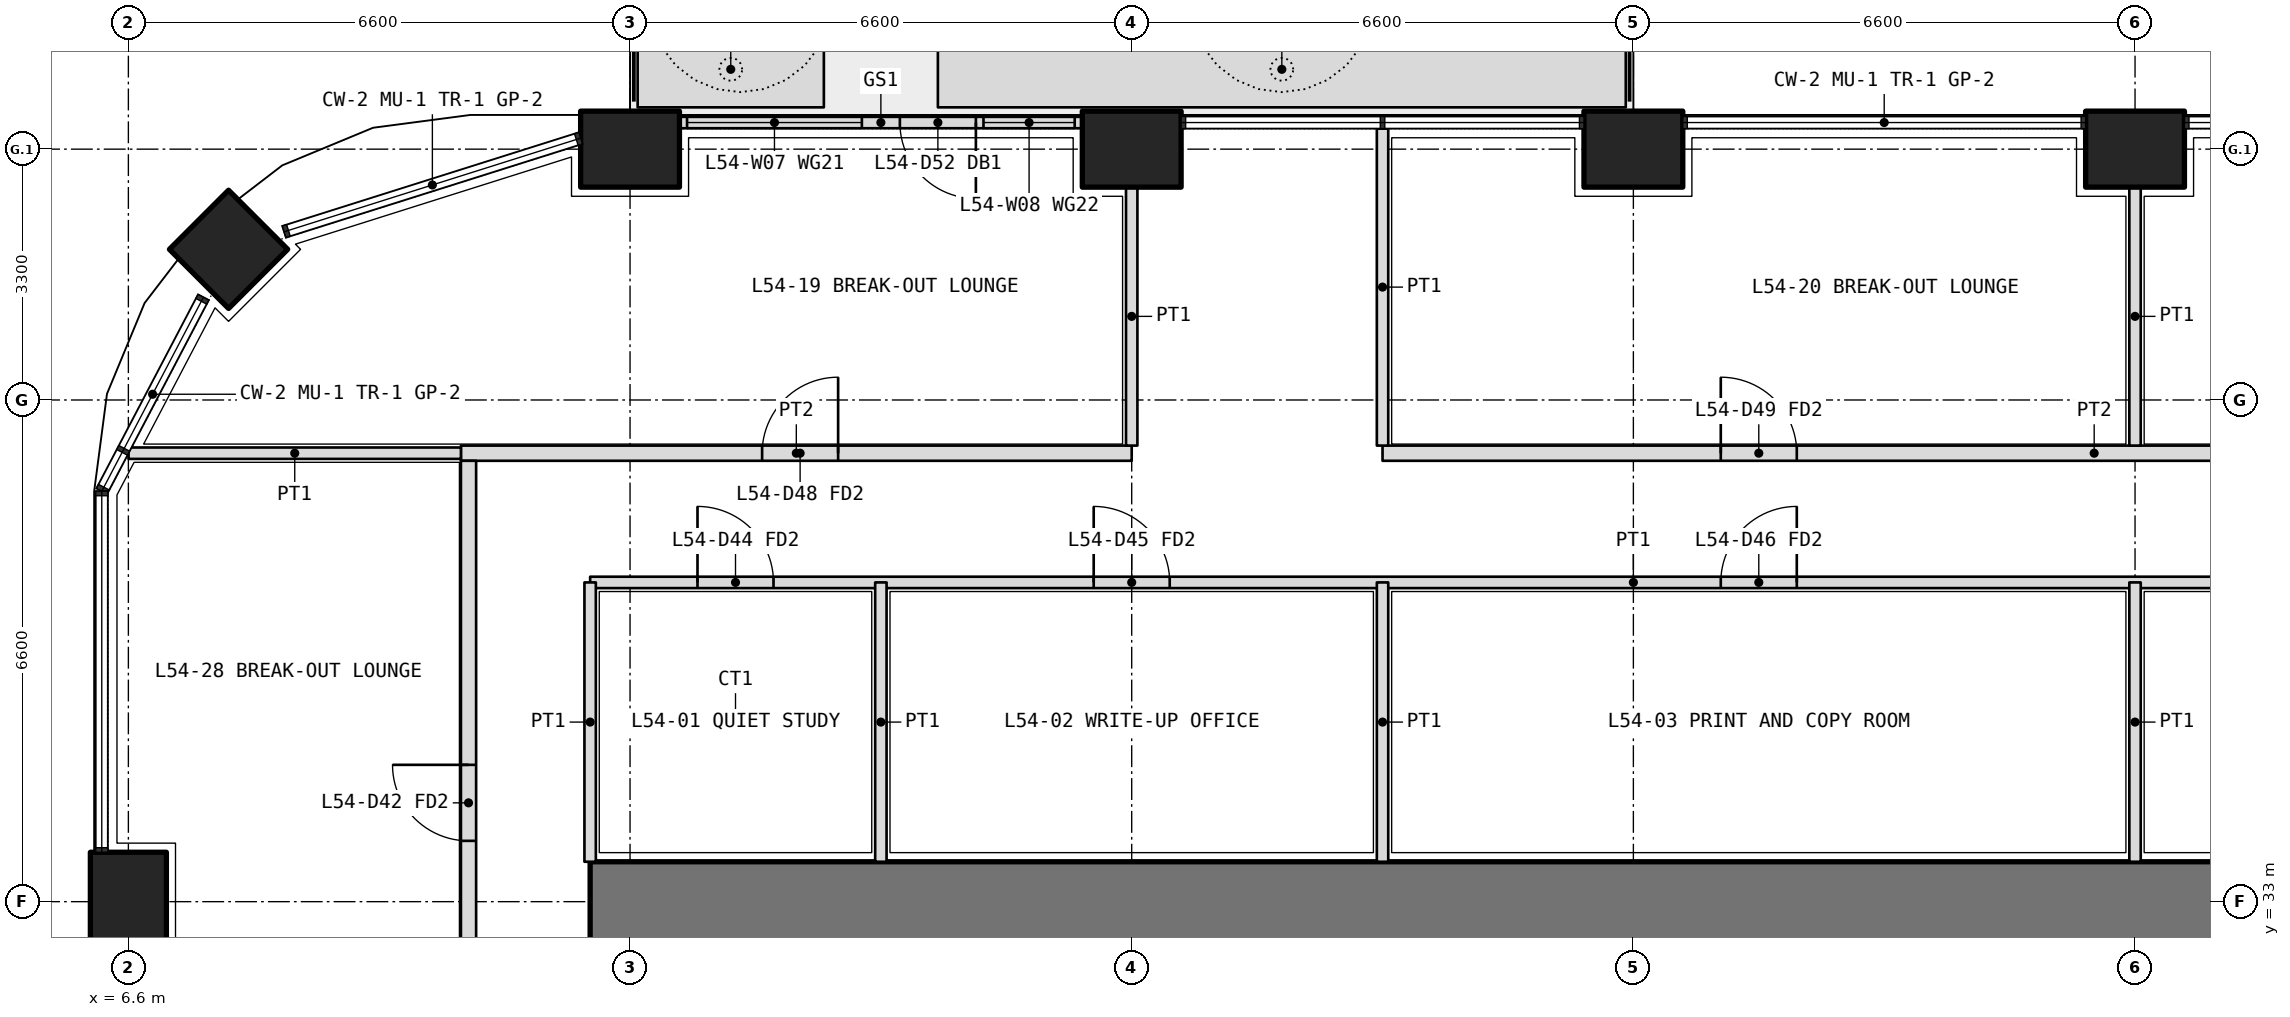
"""IFC4 building model, lengths in metres.
Left out: names, types, materials, properties, quantities, classifications, styles, units other than length and angle.
Written with IfcOpenShell. Run it as: python <this file> out.ifc"""

import sys

from ifc_helpers import new_model, si_unit, direction, frame, frame_2d, origin, origin_2d, place, context, subcontext, project, spatial, polyline, rectangle, outline, extrude, element, fill, save


model = new_model("IFC4")
c1 = context("Model", 3, precision=1e-05, world=origin(), true_north=direction((0.0, 1.0)))
c2 = subcontext(c1, "Body", "Model", "MODEL_VIEW")
j1 = project(units=[si_unit("LENGTHUNIT", "METRE"), si_unit("PLANEANGLEUNIT", "RADIAN")], contexts=[c1])
p1 = place(None, origin())
s1 = spatial("IfcSite", under=j1, at=p1, CompositionType="ELEMENT")
p2 = place(p1, origin())
s2 = spatial("IfcBuilding", under=s1, at=p2, CompositionType="ELEMENT")
p3 = place(p2, frame((0.0, 0.0, 237.6)))
s3 = spatial("IfcBuildingStorey", under=s2, at=p3, CompositionType="ELEMENT", Elevation=237.6)
p4 = place(p3, frame((7.918, 41.582, 0.0), z_axis=(0.0, 0.0, 1.0), x_axis=(0.707106781187, 0.707106781187, 0.0)))
e1 = element("IfcColumn", 1, at=p4, inside=s3, PredefinedType="COLUMN", context=c2, shape_type="SweptSolid", body=[
    extrude(rectangle(XDim=1.1, YDim=1.1, at=origin_2d()), origin(), (0.0, 0.0, 1.0), 4.2),
])
for number, where, z_axis, x_axis in (
    (2, (6.6, 33.0, 0.0), (0.0, 0.0, 1.0), (0.0, 1.0, 0.0)),
    (3, (13.2, 42.9, 0.0), (0.0, 0.0, 1.0), (1.0, 0.0, 0.0)),
    (4, (19.8, 42.9, 0.0), (0.0, 0.0, 1.0), (1.0, 0.0, 0.0)),
    (5, (26.4, 42.9, 0.0), (0.0, 0.0, 1.0), (1.0, 0.0, 0.0)),
    (6, (33.0, 42.9, 0.0), (0.0, 0.0, 1.0), (1.0, 0.0, 0.0)),
):
    element("IfcColumn", number, at=place(p3, frame(where, z_axis=z_axis, x_axis=x_axis)), inside=s3, PredefinedType="COLUMN", context=c2, shape_type="SweptSolid", body=[
        extrude(rectangle(XDim=1.3, YDim=1.0, at=origin_2d()), origin(), (0.0, 0.0, 1.0), 4.2),
    ])
p5 = place(p3, origin())
e7 = element("IfcWall", 7, at=p5, inside=s3, PredefinedType="USERDEFINED", context=c2, shape_type="SweptSolid", body=[
    extrude(outline(polyline([(13.3, 43.45), (15.75, 43.45), (15.75, 44.45), (13.3, 44.45), (13.3, 43.45)]), holes=[polyline([(13.45, 43.6), (15.6, 43.6), (15.6, 44.3), (13.45, 44.3), (13.45, 43.6)])]), origin(), (0.0, 0.0, 1.0), 1.05),
])
p6 = place(p3, origin())
e8 = element("IfcWall", 8, at=p6, inside=s3, PredefinedType="USERDEFINED", context=c2, shape_type="SweptSolid", body=[
    extrude(outline(polyline([(17.25, 43.45), (26.3, 43.45), (26.3, 44.45), (17.25, 44.45), (17.25, 43.45)]), holes=[polyline([(17.4, 43.6), (26.15, 43.6), (26.15, 44.3), (17.4, 44.3), (17.4, 43.6)])]), origin(), (0.0, 0.0, 1.0), 1.05),
])
p7 = place(p3, frame((19.15, 43.25, 0.0), z_axis=(0.0, 0.0, 1.0), x_axis=(-1.0, 0.0, 0.0)))
e9 = element("IfcWall", 9, at=p7, inside=s3, PredefinedType="SOLIDWALL", context=c2, shape_type="SweptSolid", body=[
    extrude(rectangle(XDim=5.3, YDim=0.15, at=frame_2d((2.65, 0.0))), origin(), (0.0, 0.0, 1.0), 2.7),
])
p8 = place(p7, frame((1.4, 0.0, 0.0)))
e10 = element("IfcOpeningElement", 10, at=p8, cuts=e9, PredefinedType="OPENING", context=c2, shape_type="SweptSolid", body=[
    extrude(rectangle(XDim=1.0, YDim=2.4, at=frame_2d((0.5, 1.2))), frame((0.0, 0.085, 0.0), z_axis=(0.0, -1.0, 0.0), x_axis=(1.0, 0.0, 0.0)), (0.0, 0.0, 1.0), 0.17),
])
p9 = place(p7, frame((0.1, 0.0, 0.1)))
e11 = element("IfcOpeningElement", 11, at=p9, cuts=e9, PredefinedType="OPENING", context=c2, shape_type="SweptSolid", body=[
    extrude(rectangle(XDim=1.2, YDim=2.3, at=frame_2d((0.6, 1.15))), frame((0.0, 0.085, 0.0), z_axis=(0.0, -1.0, 0.0), x_axis=(1.0, 0.0, 0.0)), (0.0, 0.0, 1.0), 0.17),
])
p10 = place(p7, frame((2.9, 0.0, 0.1)))
e12 = element("IfcOpeningElement", 12, at=p10, cuts=e9, PredefinedType="OPENING", context=c2, shape_type="SweptSolid", body=[
    extrude(rectangle(XDim=2.3, YDim=2.3, at=frame_2d((1.15, 1.15))), frame((0.0, 0.085, 0.0), z_axis=(0.0, -1.0, 0.0), x_axis=(1.0, 0.0, 0.0)), (0.0, 0.0, 1.0), 0.17),
])
p11 = place(p3, frame((40.125, 33.0, 0.0), z_axis=(0.0, 0.0, 1.0), x_axis=(-1.0, 0.0, 0.0)))
e13 = element("IfcWall", 13, at=p11, inside=s3, PredefinedType="SHEAR", context=c2, shape_type="SweptSolid", body=[
    extrude(rectangle(XDim=27.45, YDim=1.05, at=frame_2d((13.725, 0.0))), origin(), (0.0, 0.0, 1.0), 4.2),
])
p12 = place(p3, frame((12.675, 37.2, 0.0), z_axis=(0.0, 0.0, 1.0), x_axis=(1.0, 0.0, 0.0)))
e14 = element("IfcWall", 14, at=p12, inside=s3, PredefinedType="PARTITIONING", context=c2, shape_type="SweptSolid", body=[
    extrude(rectangle(XDim=27.45, YDim=0.15, at=frame_2d((13.725, 0.0))), origin(), (0.0, 0.0, 1.0), 3.0),
])
p13 = place(p12, frame((1.413, 0.0, 0.0)))
e15 = element("IfcOpeningElement", 15, at=p13, cuts=e14, PredefinedType="OPENING", context=c2, shape_type="SweptSolid", body=[
    extrude(rectangle(XDim=1.0, YDim=2.1, at=frame_2d((0.5, 1.05))), frame((0.0, 0.085, 0.0), z_axis=(0.0, -1.0, 0.0), x_axis=(1.0, 0.0, 0.0)), (0.0, 0.0, 1.0), 0.17),
])
p14 = place(p12, frame((6.625, 0.0, 0.0)))
e16 = element("IfcOpeningElement", 16, at=p14, cuts=e14, PredefinedType="OPENING", context=c2, shape_type="SweptSolid", body=[
    extrude(rectangle(XDim=1.0, YDim=2.1, at=frame_2d((0.5, 1.05))), frame((0.0, 0.085, 0.0), z_axis=(0.0, -1.0, 0.0), x_axis=(1.0, 0.0, 0.0)), (0.0, 0.0, 1.0), 0.17),
])
p15 = place(p12, frame((14.875, 0.0, 0.0)))
e17 = element("IfcOpeningElement", 17, at=p15, cuts=e14, PredefinedType="OPENING", context=c2, shape_type="SweptSolid", body=[
    extrude(rectangle(XDim=1.0, YDim=2.1, at=frame_2d((0.5, 1.05))), frame((0.0, 0.085, 0.0), z_axis=(0.0, -1.0, 0.0), x_axis=(1.0, 0.0, 0.0)), (0.0, 0.0, 1.0), 0.17),
])
p16 = place(p12, frame((23.387, 0.0, 0.0)))
e18 = element("IfcOpeningElement", 18, at=p16, cuts=e14, PredefinedType="OPENING", context=c2, shape_type="SweptSolid", body=[
    extrude(rectangle(XDim=1.0, YDim=2.1, at=frame_2d((0.5, 1.05))), frame((0.0, 0.085, 0.0), z_axis=(0.0, -1.0, 0.0), x_axis=(1.0, 0.0, 0.0)), (0.0, 0.0, 1.0), 0.17),
])
p17 = place(p3, frame((12.675, 33.525, 0.0), z_axis=(0.0, 0.0, 1.0), x_axis=(0.0, 1.0, 0.0)))
e19 = element("IfcWall", 19, at=p17, inside=s3, PredefinedType="PARTITIONING", context=c2, shape_type="SweptSolid", body=[
    extrude(rectangle(XDim=3.675, YDim=0.15, at=frame_2d((1.837, 0.0))), origin(), (0.0, 0.0, 1.0), 3.0),
])
for number, where, z_axis, x_axis in (
    (20, (16.5, 33.525, 0.0), (0.0, 0.0, 1.0), (0.0, 1.0, 0.0)),
    (21, (23.1, 33.525, 0.0), (0.0, 0.0, 1.0), (0.0, 1.0, 0.0)),
):
    element("IfcWall", number, at=place(p3, frame(where, z_axis=z_axis, x_axis=x_axis)), inside=s3, PredefinedType="PARTITIONING", context=c2, shape_type="SweptSolid", body=[
        extrude(rectangle(XDim=3.675, YDim=0.15, at=frame_2d((1.837, 0.0))), origin(), (0.0, 0.0, 1.0), 3.9),
    ])
p18 = place(p3, frame((33.0, 33.525, 0.0), z_axis=(0.0, 0.0, 1.0), x_axis=(0.0, 1.0, 0.0)))
e22 = element("IfcWall", 22, at=p18, inside=s3, PredefinedType="PARTITIONING", context=c2, shape_type="SweptSolid", body=[
    extrude(rectangle(XDim=3.675, YDim=0.15, at=frame_2d((1.837, 0.0))), origin(), (0.0, 0.0, 1.0), 3.0),
])
p19 = place(p3, frame((10.975, 38.9, 0.0), z_axis=(0.0, 0.0, 1.0), x_axis=(1.0, 0.0, 0.0)))
e23 = element("IfcWall", 23, at=p19, inside=s3, PredefinedType="PARTITIONING", context=c2, shape_type="SweptSolid", body=[
    extrude(rectangle(XDim=8.825, YDim=0.2, at=frame_2d((4.413, 0.0))), origin(), (0.0, 0.0, 1.0), 3.0),
])
p20 = place(p19, frame((3.962, 0.0, 0.0)))
e24 = element("IfcOpeningElement", 24, at=p20, cuts=e23, PredefinedType="OPENING", context=c2, shape_type="SweptSolid", body=[
    extrude(rectangle(XDim=1.0, YDim=2.1, at=frame_2d((0.5, 1.05))), frame((0.0, 0.11, 0.0), z_axis=(0.0, -1.0, 0.0), x_axis=(1.0, 0.0, 0.0)), (0.0, 0.0, 1.0), 0.22),
])
p21 = place(p3, frame((23.1, 38.9, 0.0), z_axis=(0.0, 0.0, 1.0), x_axis=(1.0, 0.0, 0.0)))
e25 = element("IfcWall", 25, at=p21, inside=s3, PredefinedType="PARTITIONING", context=c2, shape_type="SweptSolid", body=[
    extrude(rectangle(XDim=18.725, YDim=0.2, at=frame_2d((9.362, 0.0))), origin(), (0.0, 0.0, 1.0), 3.0),
])
p22 = place(p21, frame((4.45, 0.0, 0.0)))
e26 = element("IfcOpeningElement", 26, at=p22, cuts=e25, PredefinedType="OPENING", context=c2, shape_type="SweptSolid", body=[
    extrude(rectangle(XDim=1.0, YDim=2.1, at=frame_2d((0.5, 1.05))), frame((0.0, 0.11, 0.0), z_axis=(0.0, -1.0, 0.0), x_axis=(1.0, 0.0, 0.0)), (0.0, 0.0, 1.0), 0.22),
])
p23 = place(p21, frame((12.7, 0.0, 0.0)))
e27 = element("IfcOpeningElement", 27, at=p23, cuts=e25, PredefinedType="OPENING", context=c2, shape_type="SweptSolid", body=[
    extrude(rectangle(XDim=1.0, YDim=2.1, at=frame_2d((0.5, 1.05))), frame((0.0, 0.11, 0.0), z_axis=(0.0, -1.0, 0.0), x_axis=(1.0, 0.0, 0.0)), (0.0, 0.0, 1.0), 0.22),
])
p24 = place(p21, frame((17.062, 0.0, 0.0)))
e28 = element("IfcOpeningElement", 28, at=p24, cuts=e25, PredefinedType="OPENING", context=c2, shape_type="SweptSolid", body=[
    extrude(rectangle(XDim=1.0, YDim=2.1, at=frame_2d((0.5, 1.05))), frame((0.0, 0.11, 0.0), z_axis=(0.0, -1.0, 0.0), x_axis=(1.0, 0.0, 0.0)), (0.0, 0.0, 1.0), 0.22),
])
p25 = place(p3, frame((11.075, 7.4, 0.0), z_axis=(0.0, 0.0, 1.0), x_axis=(0.0, 1.0, 0.0)))
e29 = element("IfcWall", 29, at=p25, inside=s3, PredefinedType="PARTITIONING", context=c2, shape_type="SweptSolid", body=[
    extrude(rectangle(XDim=31.4, YDim=0.2, at=frame_2d((15.7, 0.0))), origin(), (0.0, 0.0, 1.0), 3.0),
])
p26 = place(p25, frame((2.35, 0.0, 0.0)))
e30 = element("IfcOpeningElement", 30, at=p26, cuts=e29, PredefinedType="OPENING", context=c2, shape_type="SweptSolid", body=[
    extrude(rectangle(XDim=1.0, YDim=2.1, at=frame_2d((0.5, 1.05))), frame((0.0, 0.11, 0.0), z_axis=(0.0, -1.0, 0.0), x_axis=(1.0, 0.0, 0.0)), (0.0, 0.0, 1.0), 0.22),
])
p27 = place(p25, frame((6.9, 0.0, 0.0)))
e31 = element("IfcOpeningElement", 31, at=p27, cuts=e29, PredefinedType="OPENING", context=c2, shape_type="SweptSolid", body=[
    extrude(rectangle(XDim=1.0, YDim=2.1, at=frame_2d((0.5, 1.05))), frame((0.0, 0.11, 0.0), z_axis=(0.0, -1.0, 0.0), x_axis=(1.0, 0.0, 0.0)), (0.0, 0.0, 1.0), 0.22),
])
p28 = place(p25, frame((10.35, 0.0, 0.0)))
e32 = element("IfcOpeningElement", 32, at=p28, cuts=e29, PredefinedType="OPENING", context=c2, shape_type="SweptSolid", body=[
    extrude(rectangle(XDim=0.9, YDim=2.1, at=frame_2d((0.45, 1.05))), frame((0.0, 0.11, 0.0), z_axis=(0.0, -1.0, 0.0), x_axis=(1.0, 0.0, 0.0)), (0.0, 0.0, 1.0), 0.22),
])
p29 = place(p25, frame((13.7, 0.0, 0.0)))
e33 = element("IfcOpeningElement", 33, at=p29, cuts=e29, PredefinedType="OPENING", context=c2, shape_type="SweptSolid", body=[
    extrude(rectangle(XDim=0.9, YDim=2.1, at=frame_2d((0.45, 1.05))), frame((0.0, 0.11, 0.0), z_axis=(0.0, -1.0, 0.0), x_axis=(1.0, 0.0, 0.0)), (0.0, 0.0, 1.0), 0.22),
])
p30 = place(p25, frame((18.5, 0.0, 0.0)))
e34 = element("IfcOpeningElement", 34, at=p30, cuts=e29, PredefinedType="OPENING", context=c2, shape_type="SweptSolid", body=[
    extrude(rectangle(XDim=1.0, YDim=2.1, at=frame_2d((0.5, 1.05))), frame((0.0, 0.11, 0.0), z_axis=(0.0, -1.0, 0.0), x_axis=(1.0, 0.0, 0.0)), (0.0, 0.0, 1.0), 0.22),
])
p31 = place(p25, frame((26.4, 0.0, 0.0)))
e35 = element("IfcOpeningElement", 35, at=p31, cuts=e29, PredefinedType="OPENING", context=c2, shape_type="SweptSolid", body=[
    extrude(rectangle(XDim=1.0, YDim=2.1, at=frame_2d((0.5, 1.05))), frame((0.0, 0.11, 0.0), z_axis=(0.0, -1.0, 0.0), x_axis=(1.0, 0.0, 0.0)), (0.0, 0.0, 1.0), 0.22),
])
p32 = place(p3, frame((6.603, 38.9, 0.0), z_axis=(0.0, 0.0, 1.0), x_axis=(1.0, 0.0, 0.0)))
e36 = element("IfcWall", 36, at=p32, inside=s3, PredefinedType="PARTITIONING", context=c2, shape_type="SweptSolid", body=[
    extrude(rectangle(XDim=4.373, YDim=0.15, at=frame_2d((2.186, 0.0))), origin(), (0.0, 0.0, 1.0), 2.7),
])
p33 = place(p3, frame((19.8, 42.4, 0.0), z_axis=(0.0, 0.0, 1.0), x_axis=(0.0, -1.0, 0.0)))
e37 = element("IfcWall", 37, at=p33, inside=s3, PredefinedType="PARTITIONING", context=c2, shape_type="SweptSolid", body=[
    extrude(rectangle(XDim=3.4, YDim=0.15, at=frame_2d((1.7, 0.0))), origin(), (0.0, 0.0, 1.0), 3.0),
])
p34 = place(p3, frame((23.1, 43.17, 0.0), z_axis=(0.0, 0.0, 1.0), x_axis=(0.0, -1.0, 0.0)))
e38 = element("IfcWall", 38, at=p34, inside=s3, PredefinedType="PARTITIONING", context=c2, shape_type="SweptSolid", body=[
    extrude(rectangle(XDim=4.17, YDim=0.15, at=frame_2d((2.085, 0.0))), origin(), (0.0, 0.0, 1.0), 2.7),
])
p35 = place(p3, frame((33.0, 42.4, 0.0), z_axis=(0.0, 0.0, 1.0), x_axis=(0.0, -1.0, 0.0)))
e39 = element("IfcWall", 39, at=p35, inside=s3, PredefinedType="PARTITIONING", context=c2, shape_type="SweptSolid", body=[
    extrude(rectangle(XDim=3.4, YDim=0.15, at=frame_2d((1.7, 0.0))), origin(), (0.0, 0.0, 1.0), 3.0),
])
p36 = place(p8, origin())
e40 = element("IfcDoor", 40, at=p36, inside=s3, OperationType="SINGLE_SWING_LEFT", PredefinedType="DOOR", context=c2, shape_type="SweptSolid", body=[
    extrude(rectangle(XDim=1.0, YDim=2.4, at=frame_2d((0.5, 1.2))), frame((0.0, 0.025, 0.0), z_axis=(0.0, -1.0, 0.0), x_axis=(1.0, 0.0, 0.0)), (0.0, 0.0, 1.0), 0.05),
])
fill(e10, e40)
p37 = place(p9, origin())
e41 = element("IfcWindow", 41, at=p37, inside=s3, PartitioningType="SINGLE_PANEL", PredefinedType="WINDOW", context=c2, shape_type="SweptSolid", body=[
    extrude(rectangle(XDim=1.2, YDim=2.3, at=frame_2d((0.6, 1.15))), frame((0.0, 0.03, 0.0), z_axis=(0.0, -1.0, 0.0), x_axis=(1.0, 0.0, 0.0)), (0.0, 0.0, 1.0), 0.06),
])
fill(e11, e41)
p38 = place(p10, origin())
e42 = element("IfcWindow", 42, at=p38, inside=s3, PartitioningType="SINGLE_PANEL", PredefinedType="WINDOW", context=c2, shape_type="SweptSolid", body=[
    extrude(rectangle(XDim=2.3, YDim=2.3, at=frame_2d((1.15, 1.15))), frame((0.0, 0.03, 0.0), z_axis=(0.0, -1.0, 0.0), x_axis=(1.0, 0.0, 0.0)), (0.0, 0.0, 1.0), 0.06),
])
fill(e12, e42)
p39 = place(p13, origin())
e43 = element("IfcDoor", 43, at=p39, inside=s3, OperationType="SINGLE_SWING_LEFT", PredefinedType="DOOR", context=c2, shape_type="SweptSolid", body=[
    extrude(rectangle(XDim=1.0, YDim=2.1, at=frame_2d((0.5, 1.05))), frame((0.0, 0.025, 0.0), z_axis=(0.0, -1.0, 0.0), x_axis=(1.0, 0.0, 0.0)), (0.0, 0.0, 1.0), 0.05),
])
fill(e15, e43)
p40 = place(p14, origin())
e44 = element("IfcDoor", 44, at=p40, inside=s3, OperationType="SINGLE_SWING_LEFT", PredefinedType="DOOR", context=c2, shape_type="SweptSolid", body=[
    extrude(rectangle(XDim=1.0, YDim=2.1, at=frame_2d((0.5, 1.05))), frame((0.0, 0.025, 0.0), z_axis=(0.0, -1.0, 0.0), x_axis=(1.0, 0.0, 0.0)), (0.0, 0.0, 1.0), 0.05),
])
fill(e16, e44)
p41 = place(p15, origin())
e45 = element("IfcDoor", 45, at=p41, inside=s3, OperationType="SINGLE_SWING_RIGHT", PredefinedType="DOOR", context=c2, shape_type="SweptSolid", body=[
    extrude(rectangle(XDim=1.0, YDim=2.1, at=frame_2d((0.5, 1.05))), frame((0.0, 0.025, 0.0), z_axis=(0.0, -1.0, 0.0), x_axis=(1.0, 0.0, 0.0)), (0.0, 0.0, 1.0), 0.05),
])
fill(e17, e45)
p42 = place(p20, origin())
e46 = element("IfcDoor", 46, at=p42, inside=s3, OperationType="SINGLE_SWING_RIGHT", PredefinedType="DOOR", context=c2, shape_type="SweptSolid", body=[
    extrude(rectangle(XDim=1.0, YDim=2.1, at=frame_2d((0.5, 1.05))), frame((0.0, 0.025, 0.0), z_axis=(0.0, -1.0, 0.0), x_axis=(1.0, 0.0, 0.0)), (0.0, 0.0, 1.0), 0.05),
])
fill(e24, e46)
p43 = place(p22, origin())
e47 = element("IfcDoor", 47, at=p43, inside=s3, OperationType="SINGLE_SWING_LEFT", PredefinedType="DOOR", context=c2, shape_type="SweptSolid", body=[
    extrude(rectangle(XDim=1.0, YDim=2.1, at=frame_2d((0.5, 1.05))), frame((0.0, 0.025, 0.0), z_axis=(0.0, -1.0, 0.0), x_axis=(1.0, 0.0, 0.0)), (0.0, 0.0, 1.0), 0.05),
])
fill(e26, e47)
p44 = place(p31, origin())
e48 = element("IfcDoor", 48, at=p44, inside=s3, OperationType="SINGLE_SWING_RIGHT", PredefinedType="DOOR", context=c2, shape_type="SweptSolid", body=[
    extrude(rectangle(XDim=1.0, YDim=2.1, at=frame_2d((0.5, 1.05))), frame((0.0, 0.025, 0.0), z_axis=(0.0, -1.0, 0.0), x_axis=(1.0, 0.0, 0.0)), (0.0, 0.0, 1.0), 0.05),
])
fill(e35, e48)
save(model, sys.argv[1])
